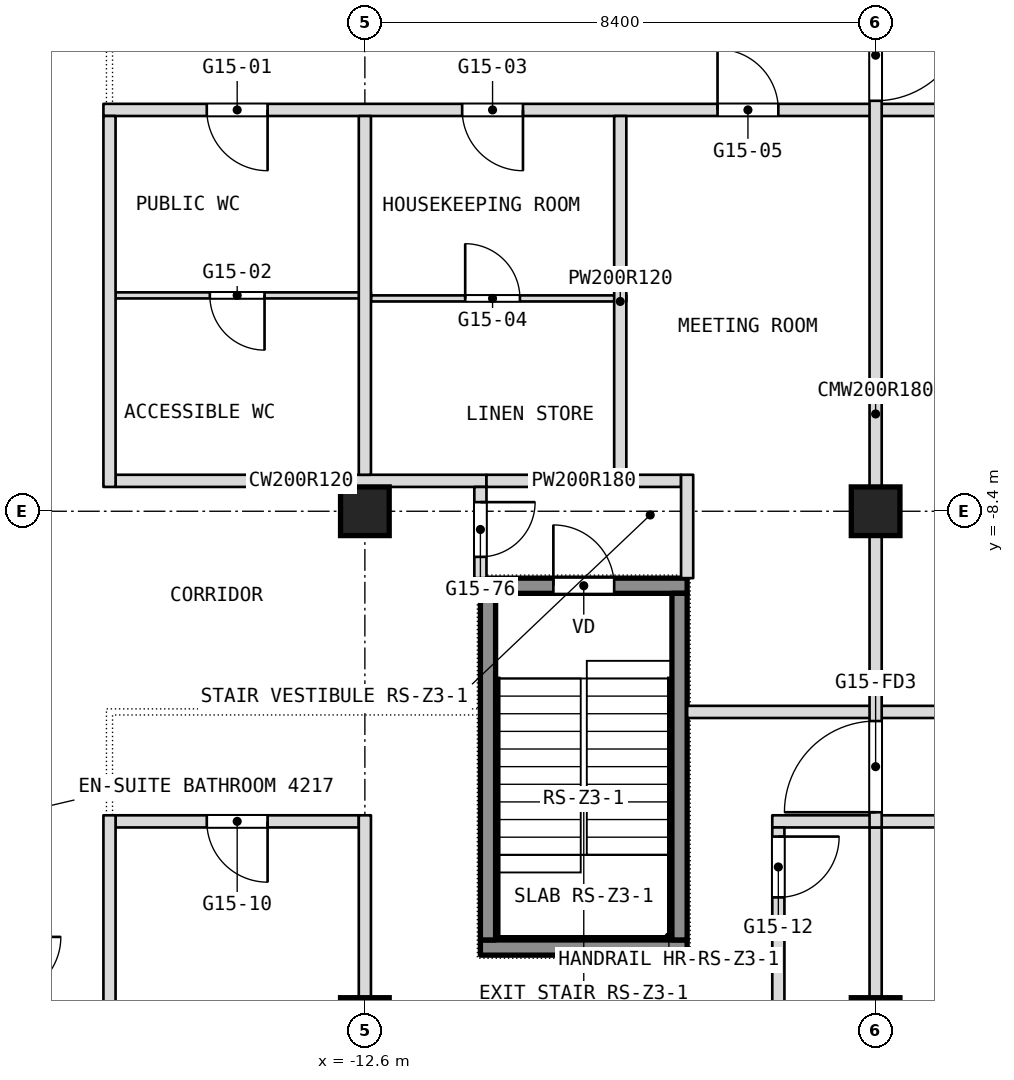
"""IFC4 building model, lengths in metres.
Left out: names, types, materials, properties, quantities, classifications, styles, units other than length and angle.
Written with IfcOpenShell. Run it as: python <this file> out.ifc"""

import sys

from ifc_helpers import new_model, si_unit, direction, frame, frame_2d, origin, origin_2d, place, context, subcontext, project, spatial, rectangle, extrude, element, fill, save


model = new_model("IFC4")
c1 = context("Model", 3, precision=1e-05, world=origin(), true_north=direction((0.0, 1.0)))
c2 = subcontext(c1, "Body", "Model", "MODEL_VIEW")
j1 = project(units=[si_unit("LENGTHUNIT", "METRE"), si_unit("PLANEANGLEUNIT", "RADIAN")], contexts=[c1])
p1 = place(None, origin())
s1 = spatial("IfcSite", under=j1, at=p1, CompositionType="ELEMENT")
p2 = place(p1, origin())
s2 = spatial("IfcBuilding", under=s1, at=p2, CompositionType="ELEMENT")
p3 = place(p2, frame((0.0, 0.0, 187.7)))
s3 = spatial("IfcBuildingStorey", under=s2, at=p3, CompositionType="ELEMENT", Elevation=187.7)
for number, where, z_axis, x_axis in (
    (1, (-12.6, -16.8, 0.0), (0.0, 0.0, 1.0), (1.0, 0.0, 0.0)),
    (2, (-12.6, -8.4, 0.0), (0.0, 0.0, 1.0), (1.0, 0.0, 0.0)),
    (3, (-4.2, -16.8, 0.0), (0.0, 0.0, 1.0), (1.0, 0.0, 0.0)),
    (4, (-4.2, -8.4, 0.0), (0.0, 0.0, 1.0), (1.0, 0.0, 0.0)),
):
    element("IfcColumn", number, at=place(p3, frame(where, z_axis=z_axis, x_axis=x_axis)), inside=s3, PredefinedType="COLUMN", context=c2, shape_type="SweptSolid", body=[
        extrude(rectangle(XDim=0.8, YDim=0.8, at=origin_2d()), origin(), (0.0, 0.0, 1.0), 3.6),
    ])
p4 = place(p3, frame((-16.7, -13.5, 0.0), z_axis=(0.0, 0.0, 1.0), x_axis=(1.0, 0.0, 0.0)))
e5 = element("IfcWall", 5, at=p4, inside=s3, PredefinedType="PARTITIONING", context=c2, shape_type="SweptSolid", body=[
    extrude(rectangle(XDim=4.0, YDim=0.2, at=frame_2d((2.0, 0.0))), origin(), (0.0, 0.0, 1.0), 3.34),
])
p5 = place(p4, frame((1.5, 0.0, 0.0)))
e6 = element("IfcOpeningElement", 6, at=p5, cuts=e5, PredefinedType="OPENING", context=c2, shape_type="SweptSolid", body=[
    extrude(rectangle(XDim=1.0, YDim=2.1, at=frame_2d((0.5, 1.05))), frame((0.0, 0.1, 0.0), z_axis=(0.0, -1.0, 0.0), x_axis=(1.0, 0.0, 0.0)), (0.0, 0.0, 1.0), 0.2),
])
p6 = place(p3, frame((-5.9, -13.5, 0.0), z_axis=(0.0, 0.0, 1.0), x_axis=(1.0, 0.0, 0.0)))
e7 = element("IfcWall", 7, at=p6, inside=s3, PredefinedType="PARTITIONING", context=c2, shape_type="SweptSolid", body=[
    extrude(rectangle(XDim=11.6, YDim=0.2, at=frame_2d((5.8, 0.0))), origin(), (0.0, 0.0, 1.0), 3.34),
])
p7 = place(p6, frame((3.3, 0.0, 0.0)))
e8 = element("IfcOpeningElement", 8, at=p7, cuts=e7, PredefinedType="OPENING", context=c2, shape_type="SweptSolid", body=[
    extrude(rectangle(XDim=1.0, YDim=2.1, at=frame_2d((0.5, 1.05))), frame((0.0, 0.1, 0.0), z_axis=(0.0, -1.0, 0.0), x_axis=(1.0, 0.0, 0.0)), (0.0, 0.0, 1.0), 0.2),
])
p8 = place(p6, frame((7.5, 0.0, 0.0)))
e9 = element("IfcOpeningElement", 9, at=p8, cuts=e7, PredefinedType="OPENING", context=c2, shape_type="SweptSolid", body=[
    extrude(rectangle(XDim=1.0, YDim=2.1, at=frame_2d((0.5, 1.05))), frame((0.0, 0.1, 0.0), z_axis=(0.0, -1.0, 0.0), x_axis=(1.0, 0.0, 0.0)), (0.0, 0.0, 1.0), 0.2),
])
p9 = place(p6, frame((10.45, 0.0, 0.0)))
e10 = element("IfcOpeningElement", 10, at=p9, cuts=e7, PredefinedType="OPENING", context=c2, shape_type="SweptSolid", body=[
    extrude(rectangle(XDim=1.0, YDim=2.1, at=frame_2d((0.5, 1.05))), frame((0.0, 0.1, 0.0), z_axis=(0.0, -1.0, 0.0), x_axis=(1.0, 0.0, 0.0)), (0.0, 0.0, 1.0), 0.2),
])
p10 = place(p3, frame((-7.3, -11.7, 0.0), z_axis=(0.0, 0.0, 1.0), x_axis=(1.0, 0.0, 0.0)))
e11 = element("IfcWall", 11, at=p10, inside=s3, PredefinedType="PARTITIONING", context=c2, shape_type="SweptSolid", body=[
    extrude(rectangle(XDim=14.6, YDim=0.2, at=frame_2d((7.3, 0.0))), origin(), (0.0, 0.0, 1.0), 3.34),
])
p11 = place(p3, frame((-16.7, -7.9, 0.0), z_axis=(0.0, 0.0, 1.0), x_axis=(1.0, 0.0, 0.0)))
e12 = element("IfcWall", 12, at=p11, inside=s3, PredefinedType="PARTITIONING", context=c2, shape_type="SweptSolid", body=[
    extrude(rectangle(XDim=6.1, YDim=0.2, at=frame_2d((3.05, 0.0))), origin(), (0.0, 0.0, 1.0), 3.34),
])
p12 = place(p3, frame((-10.6, -7.9, 0.0), z_axis=(0.0, 0.0, 1.0), x_axis=(1.0, 0.0, 0.0)))
e13 = element("IfcWall", 13, at=p12, inside=s3, PredefinedType="PARTITIONING", context=c2, shape_type="SweptSolid", body=[
    extrude(rectangle(XDim=3.2, YDim=0.2, at=frame_2d((1.6, 0.0))), origin(), (0.0, 0.0, 1.0), 3.34),
])
p13 = place(p3, frame((-12.5, -4.9, 0.0), z_axis=(0.0, 0.0, 1.0), x_axis=(1.0, 0.0, 0.0)))
e14 = element("IfcWall", 14, at=p13, inside=s3, PredefinedType="PARTITIONING", context=c2, shape_type="SweptSolid", body=[
    extrude(rectangle(XDim=4.2, YDim=0.1, at=frame_2d((2.1, 0.0))), origin(), (0.0, 0.0, 1.0), 3.34),
])
p14 = place(p13, frame((1.55, 0.0, 0.0)))
e15 = element("IfcOpeningElement", 15, at=p14, cuts=e14, PredefinedType="OPENING", context=c2, shape_type="SweptSolid", body=[
    extrude(rectangle(XDim=0.9, YDim=2.1, at=frame_2d((0.45, 1.05))), frame((0.0, 0.05, 0.0), z_axis=(0.0, -1.0, 0.0), x_axis=(1.0, 0.0, 0.0)), (0.0, 0.0, 1.0), 0.1),
])
p15 = place(p3, frame((-16.7, -4.85, 0.0), z_axis=(0.0, 0.0, 1.0), x_axis=(1.0, 0.0, 0.0)))
e16 = element("IfcWall", 16, at=p15, inside=s3, PredefinedType="PARTITIONING", context=c2, shape_type="SweptSolid", body=[
    extrude(rectangle(XDim=4.2, YDim=0.1, at=frame_2d((2.1, 0.0))), origin(), (0.0, 0.0, 1.0), 3.34),
])
p16 = place(p15, frame((1.55, 0.0, 0.0)))
e17 = element("IfcOpeningElement", 17, at=p16, cuts=e16, PredefinedType="OPENING", context=c2, shape_type="SweptSolid", body=[
    extrude(rectangle(XDim=0.9, YDim=2.1, at=frame_2d((0.45, 1.05))), frame((0.0, 0.05, 0.0), z_axis=(0.0, -1.0, 0.0), x_axis=(1.0, 0.0, 0.0)), (0.0, 0.0, 1.0), 0.1),
])
p17 = place(p3, frame((-16.9, -1.8, 0.0), z_axis=(0.0, 0.0, 1.0), x_axis=(1.0, 0.0, 0.0)))
e18 = element("IfcWall", 18, at=p17, inside=s3, PredefinedType="PARTITIONING", context=c2, shape_type="SweptSolid", body=[
    extrude(rectangle(XDim=33.8, YDim=0.2, at=frame_2d((16.9, 0.0))), origin(), (0.0, 0.0, 1.0), 3.34),
])
p18 = place(p17, frame((1.7, 0.0, 0.0)))
e19 = element("IfcOpeningElement", 19, at=p18, cuts=e18, PredefinedType="OPENING", context=c2, shape_type="SweptSolid", body=[
    extrude(rectangle(XDim=1.0, YDim=2.1, at=frame_2d((0.5, 1.05))), frame((0.0, 0.1, 0.0), z_axis=(0.0, -1.0, 0.0), x_axis=(1.0, 0.0, 0.0)), (0.0, 0.0, 1.0), 0.2),
])
p19 = place(p17, frame((5.9, 0.0, 0.0)))
e20 = element("IfcOpeningElement", 20, at=p19, cuts=e18, PredefinedType="OPENING", context=c2, shape_type="SweptSolid", body=[
    extrude(rectangle(XDim=1.0, YDim=2.1, at=frame_2d((0.5, 1.05))), frame((0.0, 0.1, 0.0), z_axis=(0.0, -1.0, 0.0), x_axis=(1.0, 0.0, 0.0)), (0.0, 0.0, 1.0), 0.2),
])
p20 = place(p17, frame((10.1, 0.0, 0.0)))
e21 = element("IfcOpeningElement", 21, at=p20, cuts=e18, PredefinedType="OPENING", context=c2, shape_type="SweptSolid", body=[
    extrude(rectangle(XDim=1.0, YDim=2.1, at=frame_2d((0.5, 1.05))), frame((0.0, 0.1, 0.0), z_axis=(0.0, -1.0, 0.0), x_axis=(1.0, 0.0, 0.0)), (0.0, 0.0, 1.0), 0.2),
])
p21 = place(p17, frame((14.3, 0.0, 0.0)))
e22 = element("IfcOpeningElement", 22, at=p21, cuts=e18, PredefinedType="OPENING", context=c2, shape_type="SweptSolid", body=[
    extrude(rectangle(XDim=1.0, YDim=2.1, at=frame_2d((0.5, 1.05))), frame((0.0, 0.1, 0.0), z_axis=(0.0, -1.0, 0.0), x_axis=(1.0, 0.0, 0.0)), (0.0, 0.0, 1.0), 0.2),
])
p22 = place(p17, frame((18.5, 0.0, 0.0)))
e23 = element("IfcOpeningElement", 23, at=p22, cuts=e18, PredefinedType="OPENING", context=c2, shape_type="SweptSolid", body=[
    extrude(rectangle(XDim=1.0, YDim=2.1, at=frame_2d((0.5, 1.05))), frame((0.0, 0.1, 0.0), z_axis=(0.0, -1.0, 0.0), x_axis=(1.0, 0.0, 0.0)), (0.0, 0.0, 1.0), 0.2),
])
p23 = place(p17, frame((24.4, 0.0, 0.0)))
e24 = element("IfcOpeningElement", 24, at=p23, cuts=e18, PredefinedType="OPENING", context=c2, shape_type="SweptSolid", body=[
    extrude(rectangle(XDim=1.8, YDim=2.1, at=frame_2d((0.9, 1.05))), frame((0.0, 0.1, 0.0), z_axis=(0.0, -1.0, 0.0), x_axis=(1.0, 0.0, 0.0)), (0.0, 0.0, 1.0), 0.2),
])
p24 = place(p17, frame((31.1, 0.0, 0.0)))
e25 = element("IfcOpeningElement", 25, at=p24, cuts=e18, PredefinedType="OPENING", context=c2, shape_type="SweptSolid", body=[
    extrude(rectangle(XDim=1.0, YDim=2.1, at=frame_2d((0.5, 1.05))), frame((0.0, 0.1, 0.0), z_axis=(0.0, -1.0, 0.0), x_axis=(1.0, 0.0, 0.0)), (0.0, 0.0, 1.0), 0.2),
])
p25 = place(p3, frame((-4.2, -22.0, 0.0), z_axis=(0.0, 0.0, 1.0), x_axis=(0.0, 1.0, 0.0)))
e26 = element("IfcWall", 26, at=p25, inside=s3, PredefinedType="PARTITIONING", context=c2, shape_type="SweptSolid", body=[
    extrude(rectangle(XDim=8.4, YDim=0.2, at=frame_2d((4.2, 0.0))), origin(), (0.0, 0.0, 1.0), 3.34),
])
p26 = place(p25, frame((0.25, 0.0, 0.0)))
e27 = element("IfcOpeningElement", 27, at=p26, cuts=e26, PredefinedType="OPENING", context=c2, shape_type="SweptSolid", body=[
    extrude(rectangle(XDim=1.5, YDim=2.1, at=frame_2d((0.75, 1.05))), frame((0.0, 0.1, 0.0), z_axis=(0.0, -1.0, 0.0), x_axis=(1.0, 0.0, 0.0)), (0.0, 0.0, 1.0), 0.2),
])
p27 = place(p3, frame((-4.2, -13.6, 0.0), z_axis=(0.0, 0.0, 1.0), x_axis=(0.0, 1.0, 0.0)))
e28 = element("IfcWall", 28, at=p27, inside=s3, PredefinedType="PARTITIONING", context=c2, shape_type="SweptSolid", body=[
    extrude(rectangle(XDim=13.6, YDim=0.2, at=frame_2d((6.8, 0.0))), origin(), (0.0, 0.0, 1.0), 3.34),
])
p28 = place(p27, frame((11.95, 0.0, 0.0)))
e29 = element("IfcOpeningElement", 29, at=p28, cuts=e28, PredefinedType="OPENING", context=c2, shape_type="SweptSolid", body=[
    extrude(rectangle(XDim=1.5, YDim=2.1, at=frame_2d((0.75, 1.05))), frame((0.0, 0.1, 0.0), z_axis=(0.0, -1.0, 0.0), x_axis=(1.0, 0.0, 0.0)), (0.0, 0.0, 1.0), 0.2),
])
p29 = place(p27, frame((0.25, 0.0, 0.0)))
e30 = element("IfcOpeningElement", 30, at=p29, cuts=e28, PredefinedType="OPENING", context=c2, shape_type="SweptSolid", body=[
    extrude(rectangle(XDim=1.5, YDim=2.1, at=frame_2d((0.75, 1.05))), frame((0.0, 0.1, 0.0), z_axis=(0.0, -1.0, 0.0), x_axis=(1.0, 0.0, 0.0)), (0.0, 0.0, 1.0), 0.2),
])
p30 = place(p3, frame((-5.8, -18.5, 0.0), z_axis=(0.0, 0.0, 1.0), x_axis=(0.0, 1.0, 0.0)))
e31 = element("IfcWall", 31, at=p30, inside=s3, PredefinedType="PARTITIONING", context=c2, shape_type="SweptSolid", body=[
    extrude(rectangle(XDim=4.9, YDim=0.2, at=frame_2d((2.45, 0.0))), origin(), (0.0, 0.0, 1.0), 3.34),
])
p31 = place(p30, frame((3.75, 0.0, 0.0)))
e32 = element("IfcOpeningElement", 32, at=p31, cuts=e31, PredefinedType="OPENING", context=c2, shape_type="SweptSolid", body=[
    extrude(rectangle(XDim=1.0, YDim=2.1, at=frame_2d((0.5, 1.05))), frame((0.0, 0.1, 0.0), z_axis=(0.0, -1.0, 0.0), x_axis=(1.0, 0.0, 0.0)), (0.0, 0.0, 1.0), 0.2),
])
p32 = place(p3, frame((-7.3, -9.5, 0.0), z_axis=(0.0, 0.0, 1.0), x_axis=(0.0, 1.0, 0.0)))
e33 = element("IfcWall", 33, at=p32, inside=s3, PredefinedType="PARTITIONING", context=c2, shape_type="SweptSolid", body=[
    extrude(rectangle(XDim=1.7, YDim=0.2, at=frame_2d((0.85, 0.0))), origin(), (0.0, 0.0, 1.0), 3.34),
])
p33 = place(p3, frame((-8.4, -8.0, 0.0), z_axis=(0.0, 0.0, 1.0), x_axis=(0.0, 1.0, 0.0)))
e34 = element("IfcWall", 34, at=p33, inside=s3, PredefinedType="PARTITIONING", context=c2, shape_type="SweptSolid", body=[
    extrude(rectangle(XDim=6.1, YDim=0.2, at=frame_2d((3.05, 0.0))), origin(), (0.0, 0.0, 1.0), 3.34),
])
p34 = place(p3, frame((-10.7, -9.5, 0.0), z_axis=(0.0, 0.0, 1.0), x_axis=(0.0, 1.0, 0.0)))
e35 = element("IfcWall", 35, at=p34, inside=s3, PredefinedType="PARTITIONING", context=c2, shape_type="SweptSolid", body=[
    extrude(rectangle(XDim=1.5, YDim=0.2, at=frame_2d((0.75, 0.0))), origin(), (0.0, 0.0, 1.0), 3.34),
])
p35 = place(p34, frame((0.35, 0.0, 0.0)))
e36 = element("IfcOpeningElement", 36, at=p35, cuts=e35, PredefinedType="OPENING", context=c2, shape_type="SweptSolid", body=[
    extrude(rectangle(XDim=0.9, YDim=2.1, at=frame_2d((0.45, 1.05))), frame((0.0, 0.1, 0.0), z_axis=(0.0, -1.0, 0.0), x_axis=(1.0, 0.0, 0.0)), (0.0, 0.0, 1.0), 0.2),
])
p36 = place(p3, frame((-12.6, -7.8, 0.0), z_axis=(0.0, 0.0, 1.0), x_axis=(0.0, 1.0, 0.0)))
e37 = element("IfcWall", 37, at=p36, inside=s3, PredefinedType="PARTITIONING", context=c2, shape_type="SweptSolid", body=[
    extrude(rectangle(XDim=5.9, YDim=0.2, at=frame_2d((2.95, 0.0))), origin(), (0.0, 0.0, 1.0), 3.34),
])
p37 = place(p3, frame((-12.6, -18.5, 0.0), z_axis=(0.0, 0.0, 1.0), x_axis=(0.0, 1.0, 0.0)))
e38 = element("IfcWall", 38, at=p37, inside=s3, PredefinedType="PARTITIONING", context=c2, shape_type="SweptSolid", body=[
    extrude(rectangle(XDim=5.1, YDim=0.2, at=frame_2d((2.55, 0.0))), origin(), (0.0, 0.0, 1.0), 3.34),
])
p38 = place(p3, frame((-16.8, -20.2, 0.0), z_axis=(0.0, 0.0, 1.0), x_axis=(0.0, 1.0, 0.0)))
e39 = element("IfcWall", 39, at=p38, inside=s3, PredefinedType="PARTITIONING", context=c2, shape_type="SweptSolid", body=[
    extrude(rectangle(XDim=6.8, YDim=0.2, at=frame_2d((3.4, 0.0))), origin(), (0.0, 0.0, 1.0), 3.34),
])
p39 = place(p3, frame((-16.8, -8.0, 0.0), z_axis=(0.0, 0.0, 1.0), x_axis=(0.0, 1.0, 0.0)))
e40 = element("IfcWall", 40, at=p39, inside=s3, PredefinedType="PARTITIONING", context=c2, shape_type="SweptSolid", body=[
    extrude(rectangle(XDim=6.1, YDim=0.2, at=frame_2d((3.05, 0.0))), origin(), (0.0, 0.0, 1.0), 3.34),
])
p40 = place(p3, frame((-10.7, -15.575, 0.1), z_axis=(0.0, 0.0, 1.0), x_axis=(1.0, 0.0, 0.0)))
e41 = element("IfcWall", 41, at=p40, inside=s3, PredefinedType="SHEAR", context=c2, shape_type="SweptSolid", body=[
    extrude(rectangle(XDim=3.4, YDim=0.25, at=frame_2d((1.7, 0.0))), origin(), (0.0, 0.0, 1.0), 3.6),
])
p41 = place(p3, frame((-10.7, -9.625, 0.1), z_axis=(0.0, 0.0, 1.0), x_axis=(1.0, 0.0, 0.0)))
e42 = element("IfcWall", 42, at=p41, inside=s3, PredefinedType="SHEAR", context=c2, shape_type="SweptSolid", body=[
    extrude(rectangle(XDim=3.4, YDim=0.25, at=frame_2d((1.7, 0.0))), origin(), (0.0, 0.0, 1.0), 3.6),
])
p42 = place(p41, frame((1.2, 0.0, 0.0)))
e43 = element("IfcOpeningElement", 43, at=p42, cuts=e42, PredefinedType="OPENING", context=c2, shape_type="SweptSolid", body=[
    extrude(rectangle(XDim=1.0, YDim=2.1, at=frame_2d((0.5, 1.05))), frame((0.0, 0.125, 0.0), z_axis=(0.0, -1.0, 0.0), x_axis=(1.0, 0.0, 0.0)), (0.0, 0.0, 1.0), 0.25),
])
for number, where, z_axis, x_axis in (
    (44, (-10.575, -15.45, 0.1), (0.0, 0.0, 1.0), (0.0, 1.0, 0.0)),
    (45, (-7.425, -15.45, 0.1), (0.0, 0.0, 1.0), (0.0, 1.0, 0.0)),
):
    element("IfcWall", number, at=place(p3, frame(where, z_axis=z_axis, x_axis=x_axis)), inside=s3, PredefinedType="SHEAR", context=c2, shape_type="SweptSolid", body=[
        extrude(rectangle(XDim=5.7, YDim=0.25, at=frame_2d((2.85, 0.0))), origin(), (0.0, 0.0, 1.0), 3.6),
    ])
p43 = place(p5, origin())
e46 = element("IfcDoor", 46, at=p43, inside=s3, OperationType="SINGLE_SWING_RIGHT", PredefinedType="DOOR", context=c2, shape_type="SweptSolid", body=[
    extrude(rectangle(XDim=1.0, YDim=2.1, at=frame_2d((0.5, 1.05))), frame((0.0, 0.025, 0.0), z_axis=(0.0, -1.0, 0.0), x_axis=(1.0, 0.0, 0.0)), (0.0, 0.0, 1.0), 0.05),
])
fill(e6, e46)
p44 = place(p14, origin())
e47 = element("IfcDoor", 47, at=p44, inside=s3, OperationType="SINGLE_SWING_RIGHT", PredefinedType="DOOR", context=c2, shape_type="SweptSolid", body=[
    extrude(rectangle(XDim=0.9, YDim=2.1, at=frame_2d((0.45, 1.05))), frame((0.0, 0.025, 0.0), z_axis=(0.0, -1.0, 0.0), x_axis=(1.0, 0.0, 0.0)), (0.0, 0.0, 1.0), 0.05),
])
fill(e15, e47)
p45 = place(p16, origin())
e48 = element("IfcDoor", 48, at=p45, inside=s3, OperationType="SINGLE_SWING_RIGHT", PredefinedType="DOOR", context=c2, shape_type="SweptSolid", body=[
    extrude(rectangle(XDim=0.9, YDim=2.1, at=frame_2d((0.45, 1.05))), frame((0.0, 0.025, 0.0), z_axis=(0.0, -1.0, 0.0), x_axis=(1.0, 0.0, 0.0)), (0.0, 0.0, 1.0), 0.05),
])
fill(e17, e48)
p46 = place(p18, origin())
e49 = element("IfcDoor", 49, at=p46, inside=s3, OperationType="SINGLE_SWING_LEFT", PredefinedType="DOOR", context=c2, shape_type="SweptSolid", body=[
    extrude(rectangle(XDim=1.0, YDim=2.1, at=frame_2d((0.5, 1.05))), frame((0.0, 0.025, 0.0), z_axis=(0.0, -1.0, 0.0), x_axis=(1.0, 0.0, 0.0)), (0.0, 0.0, 1.0), 0.05),
])
fill(e19, e49)
p47 = place(p19, origin())
e50 = element("IfcDoor", 50, at=p47, inside=s3, OperationType="SINGLE_SWING_LEFT", PredefinedType="DOOR", context=c2, shape_type="SweptSolid", body=[
    extrude(rectangle(XDim=1.0, YDim=2.1, at=frame_2d((0.5, 1.05))), frame((0.0, 0.025, 0.0), z_axis=(0.0, -1.0, 0.0), x_axis=(1.0, 0.0, 0.0)), (0.0, 0.0, 1.0), 0.05),
])
fill(e20, e50)
p48 = place(p20, origin())
e51 = element("IfcDoor", 51, at=p48, inside=s3, OperationType="SINGLE_SWING_RIGHT", PredefinedType="DOOR", context=c2, shape_type="SweptSolid", body=[
    extrude(rectangle(XDim=1.0, YDim=2.1, at=frame_2d((0.5, 1.05))), frame((0.0, 0.025, 0.0), z_axis=(0.0, -1.0, 0.0), x_axis=(1.0, 0.0, 0.0)), (0.0, 0.0, 1.0), 0.05),
])
fill(e21, e51)
p49 = place(p31, origin())
e52 = element("IfcDoor", 52, at=p49, inside=s3, OperationType="SINGLE_SWING_RIGHT", PredefinedType="DOOR", context=c2, shape_type="SweptSolid", body=[
    extrude(rectangle(XDim=1.0, YDim=2.1, at=frame_2d((0.5, 1.05))), frame((0.0, 0.025, 0.0), z_axis=(0.0, -1.0, 0.0), x_axis=(1.0, 0.0, 0.0)), (0.0, 0.0, 1.0), 0.05),
])
fill(e32, e52)
p50 = place(p35, origin())
e53 = element("IfcDoor", 53, at=p50, inside=s3, OperationType="SINGLE_SWING_LEFT", PredefinedType="DOOR", context=c2, shape_type="SweptSolid", body=[
    extrude(rectangle(XDim=0.9, YDim=2.1, at=frame_2d((0.45, 1.05))), frame((0.0, 0.025, 0.0), z_axis=(0.0, -1.0, 0.0), x_axis=(1.0, 0.0, 0.0)), (0.0, 0.0, 1.0), 0.05),
])
fill(e36, e53)
p51 = place(p42, origin())
e54 = element("IfcDoor", 54, at=p51, inside=s3, OperationType="SINGLE_SWING_LEFT", PredefinedType="DOOR", context=c2, shape_type="SweptSolid", body=[
    extrude(rectangle(XDim=1.0, YDim=2.1, at=frame_2d((0.5, 1.05))), frame((0.0, 0.025, 0.0), z_axis=(0.0, -1.0, 0.0), x_axis=(1.0, 0.0, 0.0)), (0.0, 0.0, 1.0), 0.05),
])
fill(e43, e54)
p52 = place(p28, origin())
e55 = element("IfcDoor", 55, at=p52, inside=s3, OperationType="DOUBLE_DOOR_DOUBLE_SWING", PredefinedType="DOOR", context=c2, shape_type="SweptSolid", body=[
    extrude(rectangle(XDim=1.5, YDim=2.1, at=frame_2d((0.75, 1.05))), frame((0.0, 0.025, 0.0), z_axis=(0.0, -1.0, 0.0), x_axis=(1.0, 0.0, 0.0)), (0.0, 0.0, 1.0), 0.05),
])
fill(e29, e55)
p53 = place(p29, origin())
e56 = element("IfcDoor", 56, at=p53, inside=s3, OperationType="DOUBLE_DOOR_DOUBLE_SWING", PredefinedType="DOOR", context=c2, shape_type="SweptSolid", body=[
    extrude(rectangle(XDim=1.5, YDim=2.1, at=frame_2d((0.75, 1.05))), frame((0.0, 0.025, 0.0), z_axis=(0.0, -1.0, 0.0), x_axis=(1.0, 0.0, 0.0)), (0.0, 0.0, 1.0), 0.05),
])
fill(e30, e56)
save(model, sys.argv[1])
